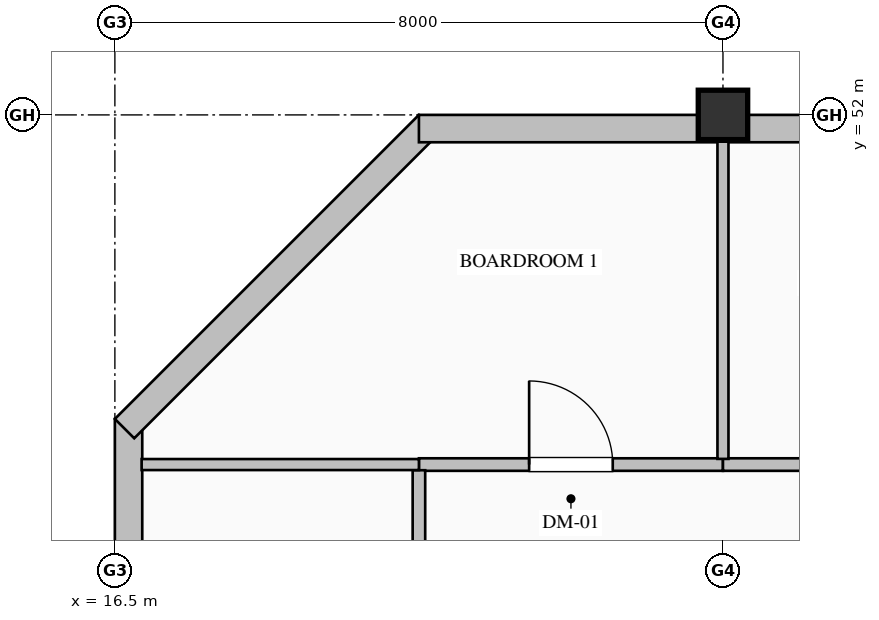
"""IFC4 building model, lengths in metres.
Left out: names, types, materials, properties, quantities, classifications, styles, units other than length and angle.
Written with IfcOpenShell. Run it as: python <this file> out.ifc"""

import sys

from ifc_helpers import new_model, si_unit, direction, frame, frame_2d, origin, origin_2d, place, context, subcontext, project, spatial, rectangle, hollow_rectangle, extrude, element, fill, save


model = new_model("IFC4")
c1 = context("Model", 3, precision=1e-05, world=origin(), true_north=direction((0.0, 1.0)))
c2 = subcontext(c1, "Body", "Model", "MODEL_VIEW")
j1 = project(units=[si_unit("LENGTHUNIT", "METRE"), si_unit("PLANEANGLEUNIT", "RADIAN")], contexts=[c1])
p1 = place(None, origin())
s1 = spatial("IfcSite", under=j1, at=p1, CompositionType="ELEMENT")
p2 = place(p1, origin())
s2 = spatial("IfcBuilding", under=s1, at=p2, CompositionType="ELEMENT")
p3 = place(p2, frame((0.0, 0.0, 307.2)))
s3 = spatial("IfcBuildingStorey", under=s2, at=p3, CompositionType="ELEMENT", Elevation=307.2)
p4 = place(p3, frame((24.5, 52.0, 0.0), z_axis=(0.0, 0.0, 1.0), x_axis=(1.0, 0.0, 0.0)))
e1 = element("IfcColumn", 1, at=p4, inside=s3, PredefinedType="COLUMN", context=c2, shape_type="SweptSolid", body=[
    extrude(hollow_rectangle(XDim=0.65, YDim=0.65, WallThickness=0.028, at=origin_2d()), origin(), (0.0, 0.0, 1.0), 4.0),
])
p5 = place(p3, frame((16.68, 32.0, 0.0), z_axis=(0.0, 0.0, 1.0), x_axis=(0.0, 1.0, 0.0)))
e2 = element("IfcWall", 2, at=p5, inside=s3, PredefinedType="SOLIDWALL", context=c2, shape_type="SweptSolid", body=[
    extrude(rectangle(XDim=16.0, YDim=0.36, at=frame_2d((8.0, 0.0))), origin(), (0.0, 0.0, 1.0), 3.335),
])
p6 = place(p5, frame((6.725, 0.0, 0.9)))
e3 = element("IfcOpeningElement", 3, at=p6, cuts=e2, PredefinedType="OPENING", context=c2, shape_type="SweptSolid", body=[
    extrude(rectangle(XDim=0.95, YDim=1.85, at=frame_2d((0.475, 0.925))), frame((0.0, 0.19, 0.0), z_axis=(0.0, -1.0, 0.0), x_axis=(1.0, 0.0, 0.0)), (0.0, 0.0, 1.0), 0.38),
])
p7 = place(p3, frame((16.627, 47.873, 0.0), z_axis=(0.0, 0.0, 1.0), x_axis=(0.707106781187, 0.707106781187, 0.0)))
e4 = element("IfcWall", 4, at=p7, inside=s3, PredefinedType="SOLIDWALL", context=c2, shape_type="SweptSolid", body=[
    extrude(rectangle(XDim=5.657, YDim=0.36, at=frame_2d((2.828, 0.0))), origin(), (0.0, 0.0, 1.0), 3.785),
])
p8 = place(p3, frame((20.5, 51.82, 0.0), z_axis=(0.0, 0.0, 1.0), x_axis=(1.0, 0.0, 0.0)))
e5 = element("IfcWall", 5, at=p8, inside=s3, PredefinedType="SOLIDWALL", context=c2, shape_type="SweptSolid", body=[
    extrude(rectangle(XDim=20.02, YDim=0.36, at=frame_2d((10.01, 0.0))), origin(), (0.0, 0.0, 1.0), 3.335),
])
p9 = place(p8, frame((6.525, 0.0, 0.9)))
e6 = element("IfcOpeningElement", 6, at=p9, cuts=e5, PredefinedType="OPENING", context=c2, shape_type="SweptSolid", body=[
    extrude(rectangle(XDim=1.35, YDim=1.85, at=frame_2d((0.675, 0.925))), frame((0.0, 0.19, 0.0), z_axis=(0.0, -1.0, 0.0), x_axis=(1.0, 0.0, 0.0)), (0.0, 0.0, 1.0), 0.38),
])
p10 = place(p3, frame((20.5, 47.4, 0.0), z_axis=(0.0, 0.0, 1.0), x_axis=(1.0, 0.0, 0.0)))
e7 = element("IfcWall", 7, at=p10, inside=s3, PredefinedType="PARTITIONING", context=c2, shape_type="SweptSolid", body=[
    extrude(rectangle(XDim=4.0, YDim=0.165, at=frame_2d((2.0, 0.0))), origin(), (0.0, 0.0, 1.0), 3.785),
])
p11 = place(p10, frame((1.45, 0.0, 0.0)))
e8 = element("IfcOpeningElement", 8, at=p11, cuts=e7, PredefinedType="OPENING", context=c2, shape_type="SweptSolid", body=[
    extrude(rectangle(XDim=1.1, YDim=2.2, at=frame_2d((0.55, 1.1))), frame((0.0, 0.093, 0.0), z_axis=(0.0, -1.0, 0.0), x_axis=(1.0, 0.0, 0.0)), (0.0, 0.0, 1.0), 0.185),
])
p12 = place(p3, frame((24.5, 47.4, 0.0), z_axis=(0.0, 0.0, 1.0), x_axis=(1.0, 0.0, 0.0)))
e9 = element("IfcWall", 9, at=p12, inside=s3, PredefinedType="PARTITIONING", context=c2, shape_type="SweptSolid", body=[
    extrude(rectangle(XDim=8.0, YDim=0.165, at=frame_2d((4.0, 0.0))), origin(), (0.0, 0.0, 1.0), 3.785),
])
p13 = place(p12, frame((3.45, 0.0, 0.0)))
e10 = element("IfcOpeningElement", 10, at=p13, cuts=e9, PredefinedType="OPENING", context=c2, shape_type="SweptSolid", body=[
    extrude(rectangle(XDim=1.1, YDim=2.2, at=frame_2d((0.55, 1.1))), frame((0.0, 0.093, 0.0), z_axis=(0.0, -1.0, 0.0), x_axis=(1.0, 0.0, 0.0)), (0.0, 0.0, 1.0), 0.185),
])
p14 = place(p3, frame((20.5, 45.274, 0.0), z_axis=(0.0, 0.0, 1.0), x_axis=(0.0, 1.0, 0.0)))
e11 = element("IfcWall", 11, at=p14, inside=s3, PredefinedType="PARTITIONING", context=c2, shape_type="SweptSolid", body=[
    extrude(rectangle(XDim=2.051, YDim=0.165, at=frame_2d((1.025, 0.0))), origin(), (0.0, 0.0, 1.0), 3.785),
])
p15 = place(p3, frame((24.5, 51.648, 0.0), z_axis=(0.0, 0.0, 1.0), x_axis=(0.0, -1.0, 0.0)))
e12 = element("IfcWall", 12, at=p15, inside=s3, PredefinedType="PARTITIONING", context=c2, shape_type="SweptSolid", body=[
    extrude(rectangle(XDim=4.173, YDim=0.145, at=frame_2d((2.087, 0.0))), origin(), (0.0, 0.0, 1.0), 3.177),
])
p16 = place(p3, frame((20.5, 47.4, 0.0), z_axis=(0.0, 0.0, 1.0), x_axis=(-1.0, 0.0, 0.0)))
e13 = element("IfcWall", 13, at=p16, inside=s3, PredefinedType="PARTITIONING", context=c2, shape_type="SweptSolid", body=[
    extrude(rectangle(XDim=3.648, YDim=0.145, at=frame_2d((1.824, 0.0))), origin(), (0.0, 0.0, 1.0), 3.785),
])
p17 = place(p11, origin())
e14 = element("IfcDoor", 14, at=p17, inside=s3, OperationType="SINGLE_SWING_LEFT", PredefinedType="DOOR", context=c2, shape_type="SweptSolid", body=[
    extrude(rectangle(XDim=1.1, YDim=2.2, at=frame_2d((0.55, 1.1))), frame((0.0, 0.025, 0.0), z_axis=(0.0, -1.0, 0.0), x_axis=(1.0, 0.0, 0.0)), (0.0, 0.0, 1.0), 0.05),
])
fill(e8, e14)
save(model, sys.argv[1])
